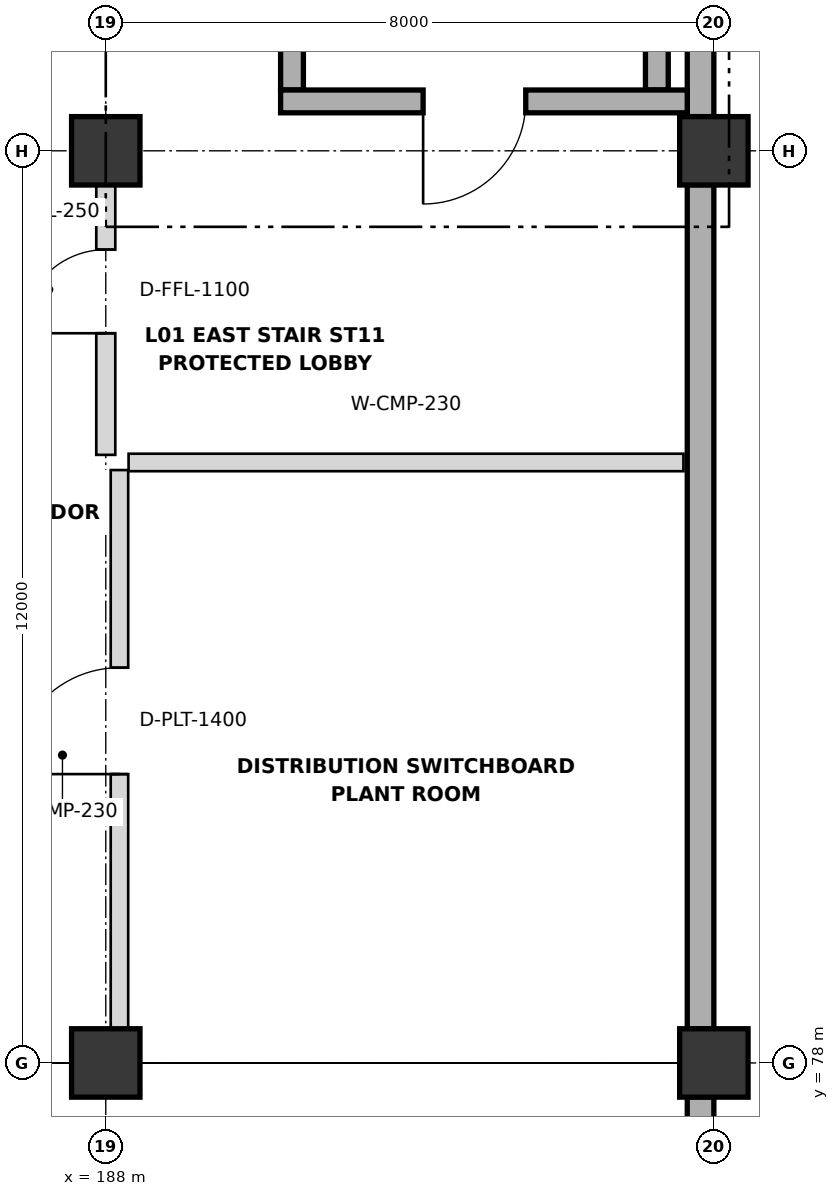
"""IFC4 building model, lengths in metres.
Left out: names, types, materials, properties, quantities, classifications, styles, units other than length and angle.
Written with IfcOpenShell. Run it as: python <this file> out.ifc"""

import sys

from ifc_helpers import new_model, si_unit, direction, frame, frame_2d, origin, origin_2d, place, context, subcontext, project, spatial, rectangle, extrude, element, fill, save


model = new_model("IFC4")
c1 = context("Model", 3, precision=1e-05, world=origin(), true_north=direction((0.0, 1.0)))
c2 = subcontext(c1, "Body", "Model", "MODEL_VIEW")
j1 = project(units=[si_unit("LENGTHUNIT", "METRE"), si_unit("PLANEANGLEUNIT", "RADIAN")], contexts=[c1])
p1 = place(None, origin())
s1 = spatial("IfcSite", under=j1, at=p1, CompositionType="ELEMENT")
p2 = place(p1, origin())
s2 = spatial("IfcBuilding", under=s1, at=p2, CompositionType="ELEMENT")
p3 = place(p2, frame((0.0, 0.0, 5.4)))
s3 = spatial("IfcBuildingStorey", under=s2, at=p3, CompositionType="ELEMENT", Elevation=5.4)
for number, where, z_axis, x_axis in (
    (1, (188.0, 78.0, 0.0), (0.0, 0.0, 1.0), (1.0, 0.0, 0.0)),
    (2, (188.0, 90.0, 0.0), (0.0, 0.0, 1.0), (1.0, 0.0, 0.0)),
    (3, (196.0, 78.0, 0.0), (0.0, 0.0, 1.0), (1.0, 0.0, 0.0)),
    (4, (196.0, 90.0, 0.0), (0.0, 0.0, 1.0), (1.0, 0.0, 0.0)),
):
    element("IfcColumn", number, at=place(p3, frame(where, z_axis=z_axis, x_axis=x_axis)), inside=s3, PredefinedType="COLUMN", context=c2, shape_type="SweptSolid", body=[
        extrude(rectangle(XDim=0.9, YDim=0.9, at=origin_2d()), origin(), (0.0, 0.0, 1.0), 4.2),
    ])
for number, where, z_axis, x_axis in (
    (5, (195.825, 77.555, 0.0), (0.0, 0.0, 1.0), (0.0, -1.0, 0.0)),
    (6, (195.825, 89.555, 0.0), (0.0, 0.0, 1.0), (0.0, -1.0, 0.0)),
    (7, (195.825, 101.555, 0.0), (0.0, 0.0, 1.0), (0.0, -1.0, 0.0)),
):
    element("IfcWall", number, at=place(p3, frame(where, z_axis=z_axis, x_axis=x_axis)), inside=s3, PredefinedType="SOLIDWALL", context=c2, shape_type="SweptSolid", body=[
        extrude(rectangle(XDim=11.11, YDim=0.35, at=frame_2d((5.555, 0.0))), origin(), (0.0, 0.0, 1.0), 4.2),
    ])
for number, where, z_axis, x_axis in (
    (8, (190.45, 90.8, 0.0), (0.0, 0.0, 1.0), (0.0, 1.0, 0.0)),
    (9, (195.25, 99.4, 0.0), (0.0, 0.0, 1.0), (0.0, -1.0, 0.0)),
):
    element("IfcWall", number, at=place(p3, frame(where, z_axis=z_axis, x_axis=x_axis)), inside=s3, PredefinedType="SHEAR", context=c2, shape_type="SweptSolid", body=[
        extrude(rectangle(XDim=8.6, YDim=0.3, at=frame_2d((4.3, 0.0))), origin(), (0.0, 0.0, 1.0), 4.2),
    ])
p4 = place(p3, frame((195.65, 90.65, 0.0), z_axis=(0.0, 0.0, 1.0), x_axis=(-1.0, 0.0, 0.0)))
e10 = element("IfcWall", 10, at=p4, inside=s3, PredefinedType="SHEAR", context=c2, shape_type="SweptSolid", body=[
    extrude(rectangle(XDim=5.35, YDim=0.3, at=frame_2d((2.675, 0.0))), origin(), (0.0, 0.0, 1.0), 4.2),
])
p5 = place(p4, frame((2.125, 0.0, 0.0)))
e11 = element("IfcOpeningElement", 11, at=p5, cuts=e10, PredefinedType="OPENING", context=c2, shape_type="SweptSolid", body=[
    extrude(rectangle(XDim=1.35, YDim=2.15, at=frame_2d((0.675, 1.075))), frame((0.0, 0.16, 0.0), z_axis=(0.0, -1.0, 0.0), x_axis=(1.0, 0.0, 0.0)), (0.0, 0.0, 1.0), 0.32),
])
p6 = place(p3, frame((188.0, 86.0, 0.0), z_axis=(0.0, 0.0, 1.0), x_axis=(0.0, 1.0, 0.0)))
e12 = element("IfcWall", 12, at=p6, inside=s3, PredefinedType="PARTITIONING", context=c2, shape_type="SweptSolid", body=[
    extrude(rectangle(XDim=4.35, YDim=0.25, at=frame_2d((2.175, 0.0))), origin(), (0.0, 0.0, 1.0), 3.018),
])
p7 = place(p6, frame((1.6, 0.0, 0.0)))
e13 = element("IfcOpeningElement", 13, at=p7, cuts=e12, PredefinedType="OPENING", context=c2, shape_type="SweptSolid", body=[
    extrude(rectangle(XDim=1.1, YDim=2.15, at=frame_2d((0.55, 1.075))), frame((0.0, 0.135, 0.0), z_axis=(0.0, -1.0, 0.0), x_axis=(1.0, 0.0, 0.0)), (0.0, 0.0, 1.0), 0.27),
])
p8 = place(p3, frame((188.18, 78.3, 0.0), z_axis=(0.0, 0.0, 1.0), x_axis=(0.0, 1.0, 0.0)))
e14 = element("IfcWall", 14, at=p8, inside=s3, PredefinedType="PARTITIONING", context=c2, shape_type="SweptSolid", body=[
    extrude(rectangle(XDim=7.5, YDim=0.23, at=frame_2d((3.75, 0.0))), origin(), (0.0, 0.0, 1.0), 3.018),
])
p9 = place(p8, frame((3.5, 0.0, 0.0)))
e15 = element("IfcOpeningElement", 15, at=p9, cuts=e14, PredefinedType="OPENING", context=c2, shape_type="SweptSolid", body=[
    extrude(rectangle(XDim=1.4, YDim=2.2, at=frame_2d((0.7, 1.1))), frame((0.0, 0.125, 0.0), z_axis=(0.0, -1.0, 0.0), x_axis=(1.0, 0.0, 0.0)), (0.0, 0.0, 1.0), 0.25),
])
p10 = place(p3, frame((188.3, 85.9, 0.0), z_axis=(0.0, 0.0, 1.0), x_axis=(1.0, 0.0, 0.0)))
e16 = element("IfcWall", 16, at=p10, inside=s3, PredefinedType="PARTITIONING", context=c2, shape_type="SweptSolid", body=[
    extrude(rectangle(XDim=7.3, YDim=0.23, at=frame_2d((3.65, 0.0))), origin(), (0.0, 0.0, 1.0), 3.118),
])
p11 = place(p5, origin())
e17 = element("IfcDoor", 17, at=p11, inside=s3, OperationType="SINGLE_SWING_RIGHT", PredefinedType="DOOR", context=c2, shape_type="SweptSolid", body=[
    extrude(rectangle(XDim=1.35, YDim=2.15, at=frame_2d((0.675, 1.075))), frame((0.0, 0.025, 0.0), z_axis=(0.0, -1.0, 0.0), x_axis=(1.0, 0.0, 0.0)), (0.0, 0.0, 1.0), 0.05),
])
fill(e11, e17)
p12 = place(p7, origin())
e18 = element("IfcDoor", 18, at=p12, inside=s3, OperationType="SINGLE_SWING_LEFT", PredefinedType="DOOR", context=c2, shape_type="SweptSolid", body=[
    extrude(rectangle(XDim=1.1, YDim=2.15, at=frame_2d((0.55, 1.075))), frame((0.0, 0.025, 0.0), z_axis=(0.0, -1.0, 0.0), x_axis=(1.0, 0.0, 0.0)), (0.0, 0.0, 1.0), 0.05),
])
fill(e13, e18)
p13 = place(p9, origin())
e19 = element("IfcDoor", 19, at=p13, inside=s3, OperationType="SINGLE_SWING_LEFT", PredefinedType="DOOR", context=c2, shape_type="SweptSolid", body=[
    extrude(rectangle(XDim=1.4, YDim=2.2, at=frame_2d((0.7, 1.1))), frame((0.0, 0.025, 0.0), z_axis=(0.0, -1.0, 0.0), x_axis=(1.0, 0.0, 0.0)), (0.0, 0.0, 1.0), 0.05),
])
fill(e15, e19)
save(model, sys.argv[1])
